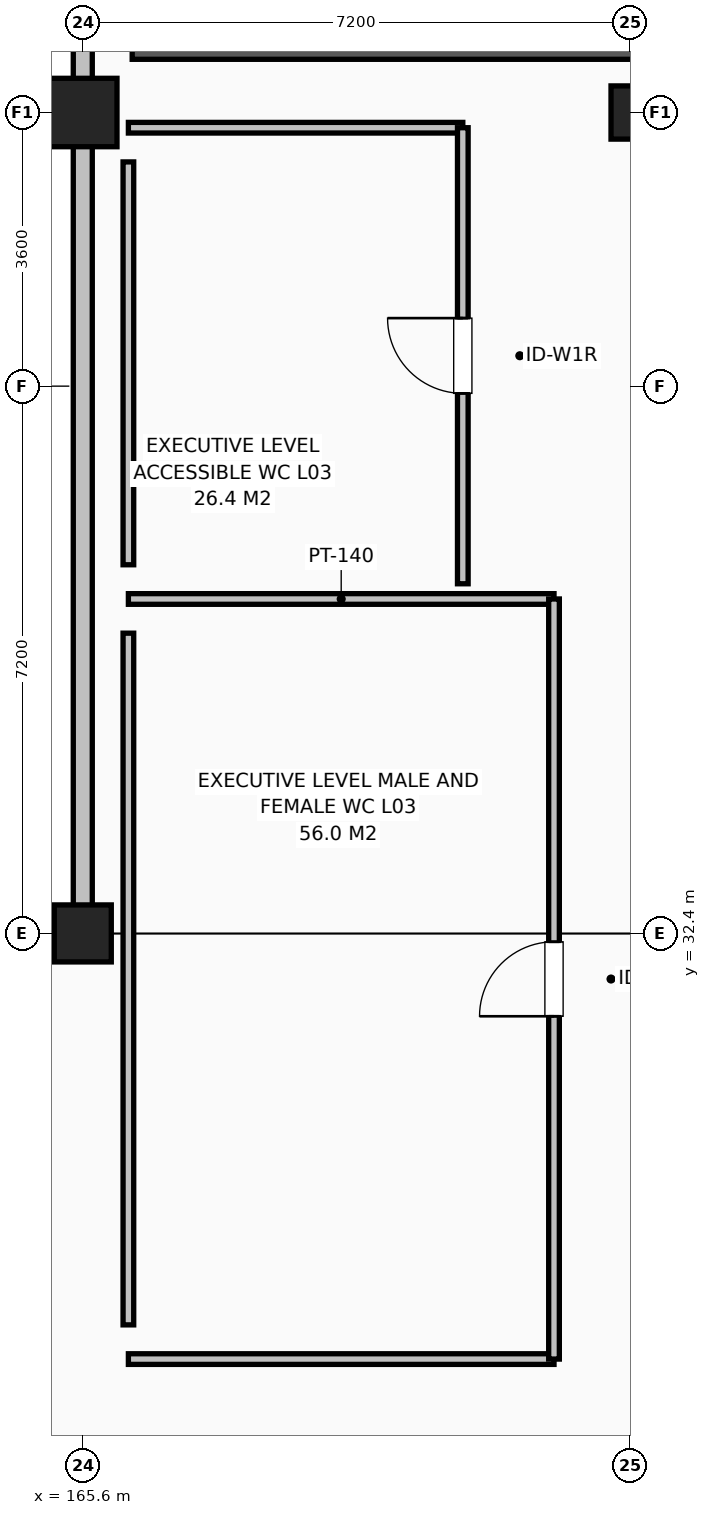
"""IFC4 building model, lengths in metres.
Left out: names, types, materials, properties, quantities, classifications, styles, units other than length and angle.
Written with IfcOpenShell. Run it as: python <this file> out.ifc"""

import sys

from ifc_helpers import new_model, si_unit, direction, frame, frame_2d, origin, origin_2d, place, context, subcontext, project, spatial, rectangle, circle, extrude, element, fill, save


model = new_model("IFC4")
c1 = context("Model", 3, precision=1e-05, world=origin(), true_north=direction((0.0, 1.0)))
c2 = subcontext(c1, "Body", "Model", "MODEL_VIEW")
j1 = project(units=[si_unit("LENGTHUNIT", "METRE"), si_unit("PLANEANGLEUNIT", "RADIAN")], contexts=[c1])
p1 = place(None, origin())
s1 = spatial("IfcSite", under=j1, at=p1, CompositionType="ELEMENT")
p2 = place(p1, origin())
s2 = spatial("IfcBuilding", under=s1, at=p2, CompositionType="ELEMENT")
p3 = place(p2, frame((0.0, 0.0, 13.2)))
s3 = spatial("IfcBuildingStorey", under=s2, at=p3, CompositionType="ELEMENT", Elevation=13.2)
p4 = place(p3, frame((165.6, 32.4, 0.0), z_axis=(0.0, 0.0, 1.0), x_axis=(1.0, 0.0, 0.0)))
e1 = element("IfcColumn", 1, at=p4, inside=s3, PredefinedType="COLUMN", context=c2, shape_type="SweptSolid", body=[
    extrude(circle(Radius=0.375, at=origin_2d()), origin(), (0.0, 0.0, 1.0), 4.2),
])
p5 = place(p3, frame((165.6, 43.2, 0.0), z_axis=(0.0, 0.0, 1.0), x_axis=(1.0, 0.0, 0.0)))
e2 = element("IfcColumn", 2, at=p5, inside=s3, PredefinedType="COLUMN", context=c2, shape_type="SweptSolid", body=[
    extrude(circle(Radius=0.45, at=origin_2d()), origin(), (0.0, 0.0, 1.0), 4.2),
])
p6 = place(p3, frame((172.8, 43.2, 0.0), z_axis=(0.0, 0.0, 1.0), x_axis=(1.0, 0.0, 0.0)))
e3 = element("IfcColumn", 3, at=p6, inside=s3, PredefinedType="COLUMN", context=c2, shape_type="SweptSolid", body=[
    extrude(rectangle(XDim=0.5, YDim=0.7, at=origin_2d()), origin(), (0.0, 0.0, 1.0), 4.2),
])
p7 = place(p3, frame((165.6, 32.4, 0.0), z_axis=(0.0, 0.0, 1.0), x_axis=(-1.0, 0.0, 0.0)))
e4 = element("IfcWall", 4, at=p7, inside=s3, PredefinedType="SOLIDWALL", context=c2, shape_type="SweptSolid", body=[
    extrude(rectangle(XDim=50.4, YDim=0.25, at=frame_2d((25.2, 0.0))), origin(), (0.0, 0.0, 1.0), 3.35),
])
p8 = place(p7, frame((2.2, 0.0, 0.78)))
e5 = element("IfcOpeningElement", 5, at=p8, cuts=e4, PredefinedType="OPENING", context=c2, shape_type="SweptSolid", body=[
    extrude(rectangle(XDim=1.35, YDim=1.75, at=frame_2d((0.675, 0.875))), frame((0.0, 0.135, 0.0), z_axis=(0.0, -1.0, 0.0), x_axis=(1.0, 0.0, 0.0)), (0.0, 0.0, 1.0), 0.27),
])
p9 = place(p7, frame((9.4, 0.0, 0.78)))
e6 = element("IfcOpeningElement", 6, at=p9, cuts=e4, PredefinedType="OPENING", context=c2, shape_type="SweptSolid", body=[
    extrude(rectangle(XDim=1.5, YDim=1.75, at=frame_2d((0.75, 0.875))), frame((0.0, 0.135, 0.0), z_axis=(0.0, -1.0, 0.0), x_axis=(1.0, 0.0, 0.0)), (0.0, 0.0, 1.0), 0.27),
])
p10 = place(p7, frame((16.6, 0.0, 0.78)))
e7 = element("IfcOpeningElement", 7, at=p10, cuts=e4, PredefinedType="OPENING", context=c2, shape_type="SweptSolid", body=[
    extrude(rectangle(XDim=1.65, YDim=1.8, at=frame_2d((0.825, 0.9))), frame((0.0, 0.135, 0.0), z_axis=(0.0, -1.0, 0.0), x_axis=(1.0, 0.0, 0.0)), (0.0, 0.0, 1.0), 0.27),
])
p11 = place(p7, frame((23.8, 0.0, 0.78)))
e8 = element("IfcOpeningElement", 8, at=p11, cuts=e4, PredefinedType="OPENING", context=c2, shape_type="SweptSolid", body=[
    extrude(rectangle(XDim=1.95, YDim=1.8, at=frame_2d((0.975, 0.9))), frame((0.0, 0.135, 0.0), z_axis=(0.0, -1.0, 0.0), x_axis=(1.0, 0.0, 0.0)), (0.0, 0.0, 1.0), 0.27),
])
p12 = place(p7, frame((31.0, 0.0, 0.78)))
e9 = element("IfcOpeningElement", 9, at=p12, cuts=e4, PredefinedType="OPENING", context=c2, shape_type="SweptSolid", body=[
    extrude(rectangle(XDim=2.1, YDim=1.8, at=frame_2d((1.05, 0.9))), frame((0.0, 0.135, 0.0), z_axis=(0.0, -1.0, 0.0), x_axis=(1.0, 0.0, 0.0)), (0.0, 0.0, 1.0), 0.27),
])
p13 = place(p7, frame((38.2, 0.0, 0.78)))
e10 = element("IfcOpeningElement", 10, at=p13, cuts=e4, PredefinedType="OPENING", context=c2, shape_type="SweptSolid", body=[
    extrude(rectangle(XDim=1.1, YDim=1.65, at=frame_2d((0.55, 0.825))), frame((0.0, 0.135, 0.0), z_axis=(0.0, -1.0, 0.0), x_axis=(1.0, 0.0, 0.0)), (0.0, 0.0, 1.0), 0.27),
])
p14 = place(p3, frame((165.6, 64.8, 0.0), z_axis=(0.0, 0.0, 1.0), x_axis=(0.0, -1.0, 0.0)))
e11 = element("IfcWall", 11, at=p14, inside=s3, PredefinedType="SOLIDWALL", context=c2, shape_type="SweptSolid", body=[
    extrude(rectangle(XDim=32.4, YDim=0.25, at=frame_2d((16.2, 0.0))), origin(), (0.0, 0.0, 1.0), 3.35),
])
p15 = place(p14, frame((2.2, 0.0, 0.78)))
e12 = element("IfcOpeningElement", 12, at=p15, cuts=e11, PredefinedType="OPENING", context=c2, shape_type="SweptSolid", body=[
    extrude(rectangle(XDim=1.95, YDim=1.8, at=frame_2d((0.975, 0.9))), frame((0.0, 0.135, 0.0), z_axis=(0.0, -1.0, 0.0), x_axis=(1.0, 0.0, 0.0)), (0.0, 0.0, 1.0), 0.27),
])
p16 = place(p14, frame((16.6, 0.0, 0.78)))
e13 = element("IfcOpeningElement", 13, at=p16, cuts=e11, PredefinedType="OPENING", context=c2, shape_type="SweptSolid", body=[
    extrude(rectangle(XDim=1.1, YDim=1.65, at=frame_2d((0.55, 0.825))), frame((0.0, 0.135, 0.0), z_axis=(0.0, -1.0, 0.0), x_axis=(1.0, 0.0, 0.0)), (0.0, 0.0, 1.0), 0.27),
])
p17 = place(p3, frame((166.25, 44.05, 0.0), z_axis=(0.0, 0.0, 1.0), x_axis=(1.0, 0.0, 0.0)))
e14 = element("IfcWall", 14, at=p17, inside=s3, PredefinedType="SHEAR", context=c2, shape_type="SweptSolid", body=[
    extrude(rectangle(XDim=7.1, YDim=0.3, at=frame_2d((3.55, 0.0))), origin(), (0.0, 0.0, 1.0), 3.45),
])
for number, where, z_axis, x_axis in (
    (15, (166.2, 36.8, 0.0), (0.0, 0.0, 1.0), (1.0, 0.0, 0.0)),
    (16, (171.8, 26.8, 0.0), (0.0, 0.0, 1.0), (-1.0, 0.0, 0.0)),
):
    element("IfcWall", number, at=place(p3, frame(where, z_axis=z_axis, x_axis=x_axis)), inside=s3, PredefinedType="PARTITIONING", context=c2, shape_type="SweptSolid", body=[
        extrude(rectangle(XDim=5.6, YDim=0.14, at=frame_2d((2.8, 0.0))), origin(), (0.0, 0.0, 1.0), 3.5),
    ])
p18 = place(p3, frame((166.2, 36.35, 0.0), z_axis=(0.0, 0.0, 1.0), x_axis=(0.0, -1.0, 0.0)))
e17 = element("IfcWall", 17, at=p18, inside=s3, PredefinedType="PARTITIONING", context=c2, shape_type="SweptSolid", body=[
    extrude(rectangle(XDim=9.1, YDim=0.14, at=frame_2d((4.55, 0.0))), origin(), (0.0, 0.0, 1.0), 3.5),
])
p19 = place(p3, frame((171.8, 26.8, 0.0), z_axis=(0.0, 0.0, 1.0), x_axis=(0.0, 1.0, 0.0)))
e18 = element("IfcWall", 18, at=p19, inside=s3, PredefinedType="PARTITIONING", context=c2, shape_type="SweptSolid", body=[
    extrude(rectangle(XDim=10.0, YDim=0.14, at=frame_2d((5.0, 0.0))), origin(), (0.0, 0.0, 1.0), 3.5),
])
p20 = place(p19, frame((4.51, 0.0, 0.0)))
e19 = element("IfcOpeningElement", 19, at=p20, cuts=e18, PredefinedType="OPENING", context=c2, shape_type="SweptSolid", body=[
    extrude(rectangle(XDim=0.98, YDim=2.15, at=frame_2d((0.49, 1.075))), frame((0.0, 0.08, 0.0), z_axis=(0.0, -1.0, 0.0), x_axis=(1.0, 0.0, 0.0)), (0.0, 0.0, 1.0), 0.16),
])
p21 = place(p3, frame((166.2, 43.0, 0.0), z_axis=(0.0, 0.0, 1.0), x_axis=(1.0, 0.0, 0.0)))
e20 = element("IfcWall", 20, at=p21, inside=s3, PredefinedType="PARTITIONING", context=c2, shape_type="SweptSolid", body=[
    extrude(rectangle(XDim=4.4, YDim=0.14, at=frame_2d((2.2, 0.0))), origin(), (0.0, 0.0, 1.0), 3.175),
])
p22 = place(p3, frame((166.2, 42.55, 0.0), z_axis=(0.0, 0.0, 1.0), x_axis=(0.0, -1.0, 0.0)))
e21 = element("IfcWall", 21, at=p22, inside=s3, PredefinedType="PARTITIONING", context=c2, shape_type="SweptSolid", body=[
    extrude(rectangle(XDim=5.3, YDim=0.14, at=frame_2d((2.65, 0.0))), origin(), (0.0, 0.0, 1.0), 3.5),
])
p23 = place(p3, frame((170.6, 37.0, 0.0), z_axis=(0.0, 0.0, 1.0), x_axis=(0.0, 1.0, 0.0)))
e22 = element("IfcWall", 22, at=p23, inside=s3, PredefinedType="PARTITIONING", context=c2, shape_type="SweptSolid", body=[
    extrude(rectangle(XDim=6.0, YDim=0.14, at=frame_2d((3.0, 0.0))), origin(), (0.0, 0.0, 1.0), 3.5),
])
p24 = place(p23, frame((2.505, 0.0, 0.0)))
e23 = element("IfcOpeningElement", 23, at=p24, cuts=e22, PredefinedType="OPENING", context=c2, shape_type="SweptSolid", body=[
    extrude(rectangle(XDim=0.99, YDim=2.15, at=frame_2d((0.495, 1.075))), frame((0.0, 0.08, 0.0), z_axis=(0.0, -1.0, 0.0), x_axis=(1.0, 0.0, 0.0)), (0.0, 0.0, 1.0), 0.16),
])
p25 = place(p20, origin())
e24 = element("IfcDoor", 24, at=p25, inside=s3, OperationType="SINGLE_SWING_LEFT", PredefinedType="DOOR", context=c2, shape_type="SweptSolid", body=[
    extrude(rectangle(XDim=0.98, YDim=2.15, at=frame_2d((0.49, 1.075))), frame((0.0, 0.025, 0.0), z_axis=(0.0, -1.0, 0.0), x_axis=(1.0, 0.0, 0.0)), (0.0, 0.0, 1.0), 0.05),
])
fill(e19, e24)
p26 = place(p24, origin())
e25 = element("IfcDoor", 25, at=p26, inside=s3, OperationType="SINGLE_SWING_RIGHT", PredefinedType="DOOR", context=c2, shape_type="SweptSolid", body=[
    extrude(rectangle(XDim=0.99, YDim=2.15, at=frame_2d((0.495, 1.075))), frame((0.0, 0.025, 0.0), z_axis=(0.0, -1.0, 0.0), x_axis=(1.0, 0.0, 0.0)), (0.0, 0.0, 1.0), 0.05),
])
fill(e23, e25)
save(model, sys.argv[1])
